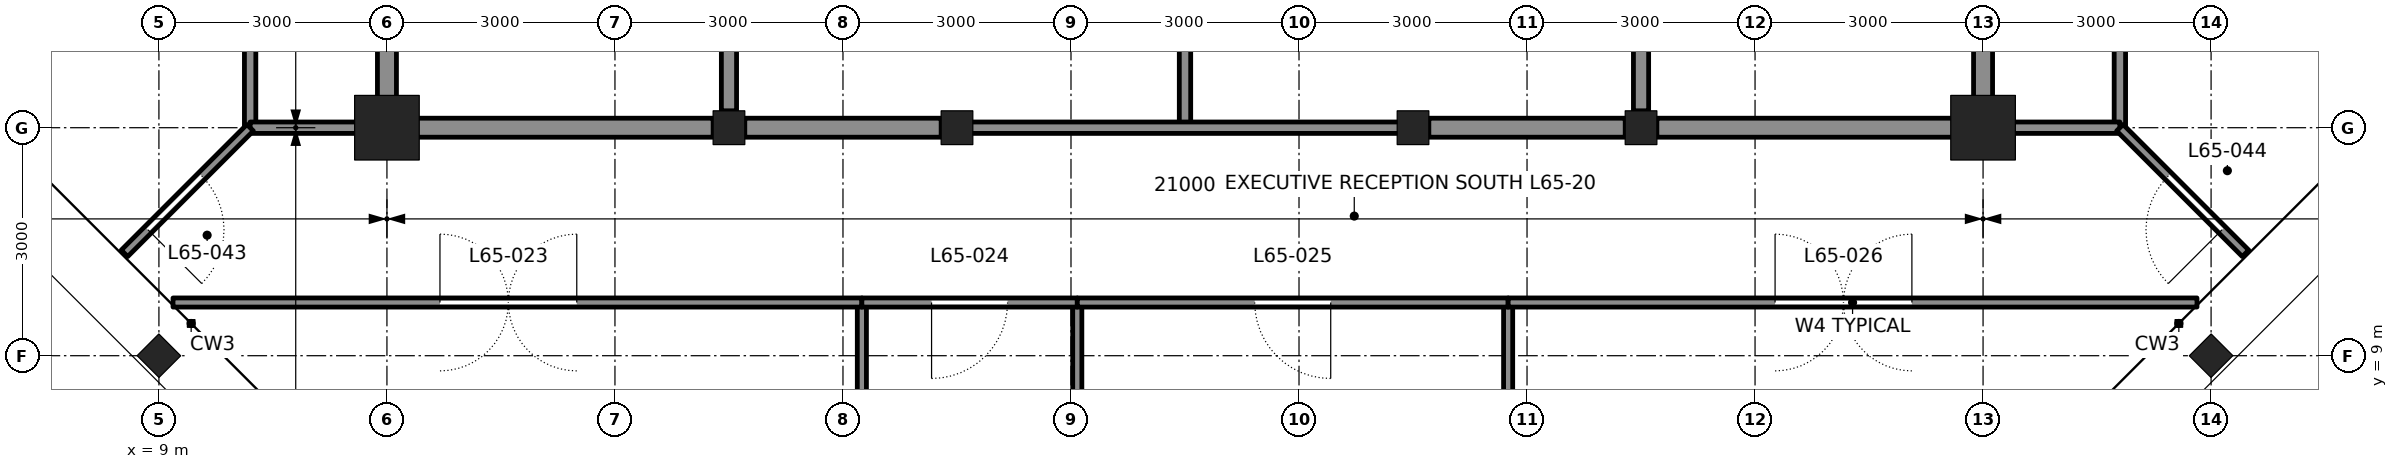
"""IFC4 building model, lengths in metres.
Left out: names, types, materials, properties, quantities, classifications, styles, units other than length and angle.
Written with IfcOpenShell. Run it as: python <this file> out.ifc"""

import sys

from ifc_helpers import new_model, si_unit, direction, frame, frame_2d, origin, origin_2d, place, context, subcontext, project, spatial, rectangle, hollow_rectangle, i_section, extrude, element, fill, save


model = new_model("IFC4")
c1 = context("Model", 3, precision=1e-05, world=origin(), true_north=direction((0.0, 1.0)))
c2 = subcontext(c1, "Body", "Model", "MODEL_VIEW")
j1 = project(units=[si_unit("LENGTHUNIT", "METRE"), si_unit("PLANEANGLEUNIT", "RADIAN")], contexts=[c1])
p1 = place(None, origin())
s1 = spatial("IfcSite", under=j1, at=p1, CompositionType="ELEMENT")
p2 = place(p1, origin())
s2 = spatial("IfcBuilding", under=s1, at=p2, CompositionType="ELEMENT")
p3 = place(p2, frame((0.0, 0.0, 291.6)))
s3 = spatial("IfcBuildingStorey", under=s2, at=p3, CompositionType="ELEMENT", Elevation=291.6)
for number, where, z_axis, x_axis in (
    (1, (36.0, 9.0, 0.0), (0.0, 0.0, 1.0), (0.707, -0.707, 0.0)),
    (2, (9.0, 9.0, 0.0), (0.0, 0.0, 1.0), (-0.707, -0.707, 0.0)),
):
    element("IfcColumn", number, at=place(p3, frame(where, z_axis=z_axis, x_axis=x_axis)), inside=s3, PredefinedType="COLUMN", context=c2, shape_type="SweptSolid", body=[
        extrude(i_section(OverallWidth=0.404, OverallDepth=0.406, WebThickness=0.027, FlangeThickness=0.044, at=origin_2d()), origin(), (0.0, 0.0, 1.0), 4.2),
    ])
p4 = place(p3, frame((12.0, 12.0, 0.0), z_axis=(0.0, 0.0, 1.0), x_axis=(1.0, 0.0, 0.0)))
e3 = element("IfcColumn", 3, at=p4, inside=s3, PredefinedType="COLUMN", context=c2, shape_type="SweptSolid", body=[
    extrude(hollow_rectangle(XDim=0.85, YDim=0.85, WallThickness=0.085, at=origin_2d()), origin(), (0.0, 0.0, 1.0), 4.2),
])
for number, where, z_axis, x_axis in (
    (4, (16.5, 12.0, 0.0), (0.0, 0.0, 1.0), (1.0, 0.0, 0.0)),
    (5, (19.5, 12.0, 0.0), (0.0, 0.0, 1.0), (1.0, 0.0, 0.0)),
    (6, (25.5, 12.0, 0.0), (0.0, 0.0, 1.0), (1.0, 0.0, 0.0)),
    (7, (28.5, 12.0, 0.0), (0.0, 0.0, 1.0), (1.0, 0.0, 0.0)),
):
    element("IfcColumn", number, at=place(p3, frame(where, z_axis=z_axis, x_axis=x_axis)), inside=s3, PredefinedType="COLUMN", context=c2, shape_type="SweptSolid", body=[
        extrude(i_section(OverallWidth=0.417, OverallDepth=0.445, WebThickness=0.039, FlangeThickness=0.063, at=origin_2d()), origin(), (0.0, 0.0, 1.0), 4.2),
    ])
p5 = place(p3, frame((33.0, 12.0, 0.0), z_axis=(0.0, 0.0, 1.0), x_axis=(1.0, 0.0, 0.0)))
e8 = element("IfcColumn", 8, at=p5, inside=s3, PredefinedType="COLUMN", context=c2, shape_type="SweptSolid", body=[
    extrude(hollow_rectangle(XDim=0.85, YDim=0.85, WallThickness=0.085, at=origin_2d()), origin(), (0.0, 0.0, 1.0), 4.2),
])
p6 = place(p3, frame((12.0, 12.25, 0.0), z_axis=(0.0, 0.0, 1.0), x_axis=(0.0, 1.0, 0.0)))
e9 = element("IfcWall", 9, at=p6, inside=s3, PredefinedType="SOLIDWALL", context=c2, shape_type="SweptSolid", body=[
    extrude(rectangle(XDim=8.528, YDim=0.25, at=frame_2d((4.264, 0.0))), origin(), (0.0, 0.0, 1.0), 3.113),
])
p7 = place(p6, frame((0.875, 0.0, 0.0)))
e10 = element("IfcOpeningElement", 10, at=p7, cuts=e9, PredefinedType="OPENING", context=c2, shape_type="SweptSolid", body=[
    extrude(rectangle(XDim=0.75, YDim=2.1, at=frame_2d((0.375, 1.05))), frame((0.0, 0.135, 0.0), z_axis=(0.0, -1.0, 0.0), x_axis=(1.0, 0.0, 0.0)), (0.0, 0.0, 1.0), 0.27),
])
p8 = place(p3, frame((12.25, 12.0, 0.0), z_axis=(0.0, 0.0, 1.0), x_axis=(1.0, 0.0, 0.0)))
e11 = element("IfcWall", 11, at=p8, inside=s3, PredefinedType="SOLIDWALL", context=c2, shape_type="SweptSolid", body=[
    extrude(rectangle(XDim=4.042, YDim=0.25, at=frame_2d((2.021, 0.0))), origin(), (0.0, 0.0, 1.0), 3.181),
])
for number, where, z_axis, x_axis in (
    (12, (16.708, 12.0, 0.0), (0.0, 0.0, 1.0), (1.0, 0.0, 0.0)),
    (13, (25.708, 12.0, 0.0), (0.0, 0.0, 1.0), (1.0, 0.0, 0.0)),
):
    element("IfcWall", number, at=place(p3, frame(where, z_axis=z_axis, x_axis=x_axis)), inside=s3, PredefinedType="SOLIDWALL", context=c2, shape_type="SweptSolid", body=[
        extrude(rectangle(XDim=2.583, YDim=0.25, at=frame_2d((1.292, 0.0))), origin(), (0.0, 0.0, 1.0), 3.181),
    ])
p9 = place(p3, frame((28.708, 12.0, 0.0), z_axis=(0.0, 0.0, 1.0), x_axis=(1.0, 0.0, 0.0)))
e14 = element("IfcWall", 14, at=p9, inside=s3, PredefinedType="SOLIDWALL", context=c2, shape_type="SweptSolid", body=[
    extrude(rectangle(XDim=4.042, YDim=0.25, at=frame_2d((2.021, 0.0))), origin(), (0.0, 0.0, 1.0), 3.181),
])
for number, where, z_axis, x_axis in (
    (15, (16.5, 12.222, 0.0), (0.0, 0.0, 1.0), (0.0, 1.0, 0.0)),
    (16, (28.5, 12.222, 0.0), (0.0, 0.0, 1.0), (0.0, 1.0, 0.0)),
):
    element("IfcWall", number, at=place(p3, frame(where, z_axis=z_axis, x_axis=x_axis)), inside=s3, PredefinedType="SOLIDWALL", context=c2, shape_type="SweptSolid", body=[
        extrude(rectangle(XDim=8.555, YDim=0.2, at=frame_2d((4.278, 0.0))), origin(), (0.0, 0.0, 1.0), 3.113),
    ])
p10 = place(p3, frame((33.0, 12.25, 0.0), z_axis=(0.0, 0.0, 1.0), x_axis=(0.0, 1.0, 0.0)))
e17 = element("IfcWall", 17, at=p10, inside=s3, PredefinedType="SOLIDWALL", context=c2, shape_type="SweptSolid", body=[
    extrude(rectangle(XDim=8.528, YDim=0.25, at=frame_2d((4.264, 0.0))), origin(), (0.0, 0.0, 1.0), 3.113),
])
p11 = place(p10, frame((6.65, 0.0, 0.0)))
e18 = element("IfcOpeningElement", 18, at=p11, cuts=e17, PredefinedType="OPENING", context=c2, shape_type="SweptSolid", body=[
    extrude(rectangle(XDim=1.2, YDim=2.1, at=frame_2d((0.6, 1.05))), frame((0.0, 0.135, 0.0), z_axis=(0.0, -1.0, 0.0), x_axis=(1.0, 0.0, 0.0)), (0.0, 0.0, 1.0), 0.27),
])
p12 = place(p10, frame((0.875, 0.0, 0.0)))
e19 = element("IfcOpeningElement", 19, at=p12, cuts=e17, PredefinedType="OPENING", context=c2, shape_type="SweptSolid", body=[
    extrude(rectangle(XDim=0.75, YDim=2.1, at=frame_2d((0.375, 1.05))), frame((0.0, 0.135, 0.0), z_axis=(0.0, -1.0, 0.0), x_axis=(1.0, 0.0, 0.0)), (0.0, 0.0, 1.0), 0.27),
])
p13 = place(p3, frame((22.5, 15.0, 0.0), z_axis=(0.0, 0.0, 1.0), x_axis=(0.0, -1.0, 0.0)))
e20 = element("IfcWall", 20, at=p13, inside=s3, PredefinedType="PARTITIONING", context=c2, shape_type="SweptSolid", body=[
    extrude(rectangle(XDim=3.0, YDim=0.15, at=frame_2d((1.5, 0.0))), origin(), (0.0, 0.0, 1.0), 4.04),
])
p14 = place(p3, frame((19.5, 12.0, 0.0), z_axis=(0.0, 0.0, 1.0), x_axis=(1.0, 0.0, 0.0)))
e21 = element("IfcWall", 21, at=p14, inside=s3, PredefinedType="PARTITIONING", context=c2, shape_type="SweptSolid", body=[
    extrude(rectangle(XDim=6.0, YDim=0.15, at=frame_2d((3.0, 0.0))), origin(), (0.0, 0.0, 1.0), 3.181),
])
p15 = place(p3, frame((18.249, 0.666, 0.0), z_axis=(0.0, 0.0, 1.0), x_axis=(0.0, 1.0, 0.0)))
e22 = element("IfcWall", 22, at=p15, inside=s3, PredefinedType="PARTITIONING", context=c2, shape_type="SweptSolid", body=[
    extrude(rectangle(XDim=9.034, YDim=0.12, at=frame_2d((4.517, 0.0))), origin(), (0.0, 0.0, 1.0), 4.04),
])
p16 = place(p3, frame((21.083, 0.653, 0.0), z_axis=(0.0, 0.0, 1.0), x_axis=(0.0, 1.0, 0.0)))
e23 = element("IfcWall", 23, at=p16, inside=s3, PredefinedType="PARTITIONING", context=c2, shape_type="SweptSolid", body=[
    extrude(rectangle(XDim=9.047, YDim=0.12, at=frame_2d((4.524, 0.0))), origin(), (0.0, 0.0, 1.0), 3.357),
])
p17 = place(p3, frame((26.751, 0.666, 0.0), z_axis=(0.0, 0.0, 1.0), x_axis=(0.0, 1.0, 0.0)))
e24 = element("IfcWall", 24, at=p17, inside=s3, PredefinedType="PARTITIONING", context=c2, shape_type="SweptSolid", body=[
    extrude(rectangle(XDim=9.034, YDim=0.12, at=frame_2d((4.517, 0.0))), origin(), (0.0, 0.0, 1.0), 4.04),
])
p18 = place(p3, frame((9.186, 9.7, 0.0), z_axis=(0.0, 0.0, 1.0), x_axis=(1.0, 0.0, 0.0)))
e25 = element("IfcWall", 25, at=p18, inside=s3, PredefinedType="PARTITIONING", context=c2, shape_type="SweptSolid", body=[
    extrude(rectangle(XDim=9.063, YDim=0.12, at=frame_2d((4.531, 0.0))), origin(), (0.0, 0.0, 1.0), 4.04),
])
p19 = place(p18, frame((3.512, 0.0, 0.0)))
e26 = element("IfcOpeningElement", 26, at=p19, cuts=e25, PredefinedType="OPENING", context=c2, shape_type="SweptSolid", body=[
    extrude(rectangle(XDim=1.8, YDim=2.4, at=frame_2d((0.9, 1.2))), frame((0.0, 0.07, 0.0), z_axis=(0.0, -1.0, 0.0), x_axis=(1.0, 0.0, 0.0)), (0.0, 0.0, 1.0), 0.14),
])
p20 = place(p3, frame((18.249, 9.7, 0.0), z_axis=(0.0, 0.0, 1.0), x_axis=(1.0, 0.0, 0.0)))
e27 = element("IfcWall", 27, at=p20, inside=s3, PredefinedType="PARTITIONING", context=c2, shape_type="SweptSolid", body=[
    extrude(rectangle(XDim=2.834, YDim=0.12, at=frame_2d((1.417, 0.0))), origin(), (0.0, 0.0, 1.0), 4.04),
])
p21 = place(p20, frame((0.917, 0.0, 0.0)))
e28 = element("IfcOpeningElement", 28, at=p21, cuts=e27, PredefinedType="OPENING", context=c2, shape_type="SweptSolid", body=[
    extrude(rectangle(XDim=1.0, YDim=2.4, at=frame_2d((0.5, 1.2))), frame((0.0, 0.07, 0.0), z_axis=(0.0, -1.0, 0.0), x_axis=(1.0, 0.0, 0.0)), (0.0, 0.0, 1.0), 0.14),
])
p22 = place(p3, frame((21.083, 9.7, 0.0), z_axis=(0.0, 0.0, 1.0), x_axis=(1.0, 0.0, 0.0)))
e29 = element("IfcWall", 29, at=p22, inside=s3, PredefinedType="PARTITIONING", context=c2, shape_type="SweptSolid", body=[
    extrude(rectangle(XDim=5.669, YDim=0.12, at=frame_2d((2.834, 0.0))), origin(), (0.0, 0.0, 1.0), 4.04),
])
p23 = place(p22, frame((2.334, 0.0, 0.0)))
e30 = element("IfcOpeningElement", 30, at=p23, cuts=e29, PredefinedType="OPENING", context=c2, shape_type="SweptSolid", body=[
    extrude(rectangle(XDim=1.0, YDim=2.4, at=frame_2d((0.5, 1.2))), frame((0.0, 0.07, 0.0), z_axis=(0.0, -1.0, 0.0), x_axis=(1.0, 0.0, 0.0)), (0.0, 0.0, 1.0), 0.14),
])
p24 = place(p3, frame((26.751, 9.7, 0.0), z_axis=(0.0, 0.0, 1.0), x_axis=(1.0, 0.0, 0.0)))
e31 = element("IfcWall", 31, at=p24, inside=s3, PredefinedType="PARTITIONING", context=c2, shape_type="SweptSolid", body=[
    extrude(rectangle(XDim=9.063, YDim=0.12, at=frame_2d((4.531, 0.0))), origin(), (0.0, 0.0, 1.0), 4.04),
])
p25 = place(p24, frame((3.512, 0.0, 0.0)))
e32 = element("IfcOpeningElement", 32, at=p25, cuts=e31, PredefinedType="OPENING", context=c2, shape_type="SweptSolid", body=[
    extrude(rectangle(XDim=1.8, YDim=2.4, at=frame_2d((0.9, 1.2))), frame((0.0, 0.07, 0.0), z_axis=(0.0, -1.0, 0.0), x_axis=(1.0, 0.0, 0.0)), (0.0, 0.0, 1.0), 0.14),
])
p26 = place(p3, frame((10.2, 12.0, 0.0), z_axis=(0.0, 0.0, 1.0), x_axis=(0.0, 1.0, 0.0)))
e33 = element("IfcWall", 33, at=p26, inside=s3, PredefinedType="PARTITIONING", context=c2, shape_type="SweptSolid", body=[
    extrude(rectangle(XDim=24.314, YDim=0.15, at=frame_2d((12.157, 0.0))), origin(), (0.0, 0.0, 1.0), 4.04),
])
p27 = place(p26, frame((11.5, 0.0, 0.0)))
e34 = element("IfcOpeningElement", 34, at=p27, cuts=e33, PredefinedType="OPENING", context=c2, shape_type="SweptSolid", body=[
    extrude(rectangle(XDim=1.0, YDim=2.4, at=frame_2d((0.5, 1.2))), frame((0.0, 0.085, 0.0), z_axis=(0.0, -1.0, 0.0), x_axis=(1.0, 0.0, 0.0)), (0.0, 0.0, 1.0), 0.17),
])
p28 = place(p3, frame((10.2, 12.0, 0.0), z_axis=(0.0, 0.0, 1.0), x_axis=(1.0, 0.0, 0.0)))
e35 = element("IfcWall", 35, at=p28, inside=s3, PredefinedType="PARTITIONING", context=c2, shape_type="SweptSolid", body=[
    extrude(rectangle(XDim=1.8, YDim=0.15, at=frame_2d((0.9, 0.0))), origin(), (0.0, 0.0, 1.0), 3.27),
])
p29 = place(p3, frame((34.8, 12.0, 0.0), z_axis=(0.0, 0.0, 1.0), x_axis=(0.0, 1.0, 0.0)))
e36 = element("IfcWall", 36, at=p29, inside=s3, PredefinedType="PARTITIONING", context=c2, shape_type="SweptSolid", body=[
    extrude(rectangle(XDim=24.314, YDim=0.15, at=frame_2d((12.157, 0.0))), origin(), (0.0, 0.0, 1.0), 4.04),
])
p30 = place(p29, frame((11.5, 0.0, 0.0)))
e37 = element("IfcOpeningElement", 37, at=p30, cuts=e36, PredefinedType="OPENING", context=c2, shape_type="SweptSolid", body=[
    extrude(rectangle(XDim=1.0, YDim=2.4, at=frame_2d((0.5, 1.2))), frame((0.0, 0.085, 0.0), z_axis=(0.0, -1.0, 0.0), x_axis=(1.0, 0.0, 0.0)), (0.0, 0.0, 1.0), 0.17),
])
p31 = place(p3, frame((33.0, 12.0, 0.0), z_axis=(0.0, 0.0, 1.0), x_axis=(1.0, 0.0, 0.0)))
e38 = element("IfcWall", 38, at=p31, inside=s3, PredefinedType="PARTITIONING", context=c2, shape_type="SweptSolid", body=[
    extrude(rectangle(XDim=1.8, YDim=0.15, at=frame_2d((0.9, 0.0))), origin(), (0.0, 0.0, 1.0), 3.27),
])
p32 = place(p3, frame((10.2, 12.0, 0.0), z_axis=(0.0, 0.0, 1.0), x_axis=(-0.707106781187, -0.707106781187, 0.0)))
e39 = element("IfcWall", 39, at=p32, inside=s3, PredefinedType="PARTITIONING", context=c2, shape_type="SweptSolid", body=[
    extrude(rectangle(XDim=2.338, YDim=0.12, at=frame_2d((1.169, 0.0))), origin(), (0.0, 0.0, 1.0), 4.04),
])
p33 = place(p32, frame((0.9, 0.0, 0.0)))
e40 = element("IfcOpeningElement", 40, at=p33, cuts=e39, PredefinedType="OPENING", context=c2, shape_type="SweptSolid", body=[
    extrude(rectangle(XDim=1.0, YDim=2.4, at=frame_2d((0.5, 1.2))), frame((0.0, 0.07, 0.0), z_axis=(0.0, -1.0, 0.0), x_axis=(1.0, 0.0, 0.0)), (0.0, 0.0, 1.0), 0.14),
])
p34 = place(p3, frame((34.8, 12.0, 0.0), z_axis=(0.0, 0.0, 1.0), x_axis=(0.707106781187, -0.707106781187, 0.0)))
e41 = element("IfcWall", 41, at=p34, inside=s3, PredefinedType="PARTITIONING", context=c2, shape_type="SweptSolid", body=[
    extrude(rectangle(XDim=2.338, YDim=0.12, at=frame_2d((1.169, 0.0))), origin(), (0.0, 0.0, 1.0), 4.04),
])
p35 = place(p34, frame((0.9, 0.0, 0.0)))
e42 = element("IfcOpeningElement", 42, at=p35, cuts=e41, PredefinedType="OPENING", context=c2, shape_type="SweptSolid", body=[
    extrude(rectangle(XDim=1.0, YDim=2.4, at=frame_2d((0.5, 1.2))), frame((0.0, 0.07, 0.0), z_axis=(0.0, -1.0, 0.0), x_axis=(1.0, 0.0, 0.0)), (0.0, 0.0, 1.0), 0.14),
])
p36 = place(p19, origin())
e43 = element("IfcDoor", 43, at=p36, inside=s3, OperationType="DOUBLE_DOOR_DOUBLE_SWING", PredefinedType="DOOR", context=c2, shape_type="SweptSolid", body=[
    extrude(rectangle(XDim=1.8, YDim=2.4, at=frame_2d((0.9, 1.2))), frame((0.0, 0.025, 0.0), z_axis=(0.0, -1.0, 0.0), x_axis=(1.0, 0.0, 0.0)), (0.0, 0.0, 1.0), 0.05),
])
fill(e26, e43)
p37 = place(p21, frame((1.0, 0.0, 0.0), z_axis=(0.0, 0.0, 1.0), x_axis=(-1.0, 0.0, 0.0)))
e44 = element("IfcDoor", 44, at=p37, inside=s3, OperationType="SINGLE_SWING_RIGHT", PredefinedType="DOOR", context=c2, shape_type="SweptSolid", body=[
    extrude(rectangle(XDim=1.0, YDim=2.4, at=frame_2d((0.5, 1.2))), frame((0.0, 0.025, 0.0), z_axis=(0.0, -1.0, 0.0), x_axis=(1.0, 0.0, 0.0)), (0.0, 0.0, 1.0), 0.05),
])
fill(e28, e44)
p38 = place(p23, frame((1.0, 0.0, 0.0), z_axis=(0.0, 0.0, 1.0), x_axis=(-1.0, 0.0, 0.0)))
e45 = element("IfcDoor", 45, at=p38, inside=s3, OperationType="SINGLE_SWING_LEFT", PredefinedType="DOOR", context=c2, shape_type="SweptSolid", body=[
    extrude(rectangle(XDim=1.0, YDim=2.4, at=frame_2d((0.5, 1.2))), frame((0.0, 0.025, 0.0), z_axis=(0.0, -1.0, 0.0), x_axis=(1.0, 0.0, 0.0)), (0.0, 0.0, 1.0), 0.05),
])
fill(e30, e45)
p39 = place(p25, origin())
e46 = element("IfcDoor", 46, at=p39, inside=s3, OperationType="DOUBLE_DOOR_DOUBLE_SWING", PredefinedType="DOOR", context=c2, shape_type="SweptSolid", body=[
    extrude(rectangle(XDim=1.8, YDim=2.4, at=frame_2d((0.9, 1.2))), frame((0.0, 0.025, 0.0), z_axis=(0.0, -1.0, 0.0), x_axis=(1.0, 0.0, 0.0)), (0.0, 0.0, 1.0), 0.05),
])
fill(e32, e46)
p40 = place(p33, origin())
e47 = element("IfcDoor", 47, at=p40, inside=s3, OperationType="SINGLE_SWING_RIGHT", PredefinedType="DOOR", context=c2, shape_type="SweptSolid", body=[
    extrude(rectangle(XDim=1.0, YDim=2.4, at=frame_2d((0.5, 1.2))), frame((0.0, 0.025, 0.0), z_axis=(0.0, -1.0, 0.0), x_axis=(1.0, 0.0, 0.0)), (0.0, 0.0, 1.0), 0.05),
])
fill(e40, e47)
p41 = place(p35, frame((1.0, 0.0, 0.0), z_axis=(0.0, 0.0, 1.0), x_axis=(-1.0, 0.0, 0.0)))
e48 = element("IfcDoor", 48, at=p41, inside=s3, OperationType="SINGLE_SWING_LEFT", PredefinedType="DOOR", context=c2, shape_type="SweptSolid", body=[
    extrude(rectangle(XDim=1.0, YDim=2.4, at=frame_2d((0.5, 1.2))), frame((0.0, 0.025, 0.0), z_axis=(0.0, -1.0, 0.0), x_axis=(1.0, 0.0, 0.0)), (0.0, 0.0, 1.0), 0.05),
])
fill(e42, e48)
save(model, sys.argv[1])
